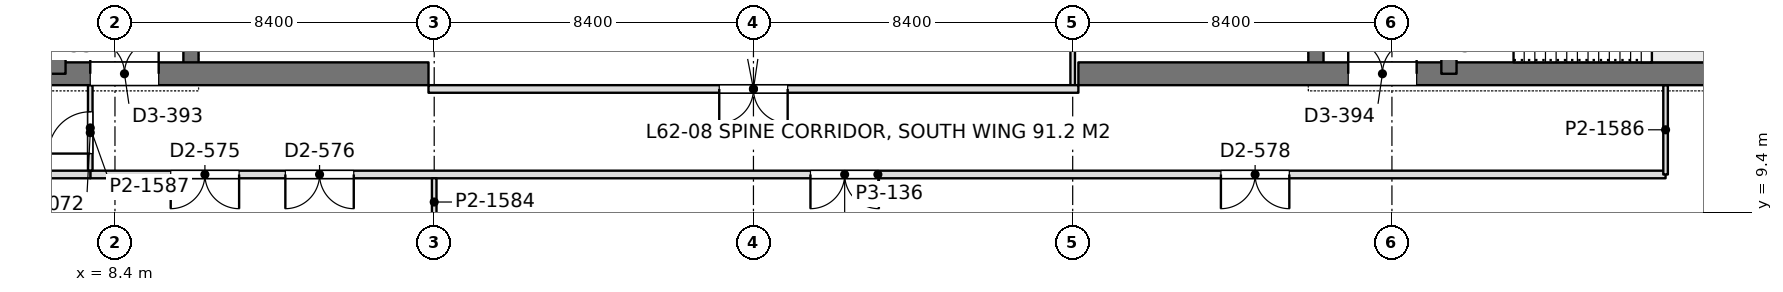
"""IFC4 building model, lengths in metres.
Left out: names, types, materials, properties, quantities, classifications, styles, units other than length and angle.
Written with IfcOpenShell. Run it as: python <this file> out.ifc"""

import sys

from ifc_helpers import new_model, si_unit, direction, frame, frame_2d, origin, place, context, subcontext, project, spatial, rectangle, extrude, element, fill, save


model = new_model("IFC4")
c1 = context("Model", 3, precision=1e-05, world=origin(), true_north=direction((0.0, 1.0)))
c2 = subcontext(c1, "Body", "Model", "MODEL_VIEW")
j1 = project(units=[si_unit("LENGTHUNIT", "METRE"), si_unit("PLANEANGLEUNIT", "RADIAN")], contexts=[c1])
p1 = place(None, origin())
s1 = spatial("IfcSite", under=j1, at=p1, CompositionType="ELEMENT")
p2 = place(p1, origin())
s2 = spatial("IfcBuilding", under=s1, at=p2, CompositionType="ELEMENT")
p3 = place(p2, frame((0.0, 0.0, 272.7)))
s3 = spatial("IfcBuildingStorey", under=s2, at=p3, CompositionType="ELEMENT", Elevation=272.7)
p4 = place(p3, frame((-1.05, 13.05, 0.0), z_axis=(0.0, 0.0, 1.0), x_axis=(1.0, 0.0, 0.0)))
e1 = element("IfcWall", 1, at=p4, inside=s3, PredefinedType="SHEAR", context=c2, shape_type="SweptSolid", body=[
    extrude(rectangle(XDim=17.7, YDim=0.6, at=frame_2d((8.85, 0.0))), origin(), (0.0, 0.0, 1.0), 4.5),
])
p5 = place(p4, frame((8.8, 0.0, 0.0)))
e2 = element("IfcOpeningElement", 2, at=p5, cuts=e1, PredefinedType="OPENING", context=c2, shape_type="SweptSolid", body=[
    extrude(rectangle(XDim=1.8, YDim=2.4, at=frame_2d((0.9, 1.2))), frame((0.0, 0.31, 0.0), z_axis=(0.0, -1.0, 0.0), x_axis=(1.0, 0.0, 0.0)), (0.0, 0.0, 1.0), 0.62),
])
p6 = place(p3, frame((6.9, 13.05, 0.0), z_axis=(0.0, 0.0, 1.0), x_axis=(0.0, 1.0, 0.0)))
e3 = element("IfcWall", 3, at=p6, inside=s3, PredefinedType="SHEAR", context=c2, shape_type="SweptSolid", body=[
    extrude(rectangle(XDim=24.3, YDim=0.4, at=frame_2d((12.15, 0.0))), origin(), (0.0, 0.0, 1.0), 4.5),
])
p7 = place(p6, frame((1.3, 0.0, 0.0)))
e4 = element("IfcOpeningElement", 4, at=p7, cuts=e3, PredefinedType="OPENING", context=c2, shape_type="SweptSolid", body=[
    extrude(rectangle(XDim=1.0, YDim=2.2, at=frame_2d((0.5, 1.1))), frame((0.0, 0.21, 0.0), z_axis=(0.0, -1.0, 0.0), x_axis=(1.0, 0.0, 0.0)), (0.0, 0.0, 1.0), 0.42),
])
p8 = place(p6, frame((22.0, 0.0, 0.0)))
e5 = element("IfcOpeningElement", 5, at=p8, cuts=e3, PredefinedType="OPENING", context=c2, shape_type="SweptSolid", body=[
    extrude(rectangle(XDim=1.0, YDim=2.2, at=frame_2d((0.5, 1.1))), frame((0.0, 0.21, 0.0), z_axis=(0.0, -1.0, 0.0), x_axis=(1.0, 0.0, 0.0)), (0.0, 0.0, 1.0), 0.42),
])
p9 = place(p6, frame((5.55, 0.0, 0.0)))
e6 = element("IfcOpeningElement", 6, at=p9, cuts=e3, PredefinedType="OPENING", context=c2, shape_type="SweptSolid", body=[
    extrude(rectangle(XDim=1.0, YDim=2.2, at=frame_2d((0.5, 1.1))), frame((0.0, 0.21, 0.0), z_axis=(0.0, -1.0, 0.0), x_axis=(1.0, 0.0, 0.0)), (0.0, 0.0, 1.0), 0.42),
])
p10 = place(p6, frame((9.55, 0.0, 0.0)))
e7 = element("IfcOpeningElement", 7, at=p10, cuts=e3, PredefinedType="OPENING", context=c2, shape_type="SweptSolid", body=[
    extrude(rectangle(XDim=1.0, YDim=2.2, at=frame_2d((0.5, 1.1))), frame((0.0, 0.21, 0.0), z_axis=(0.0, -1.0, 0.0), x_axis=(1.0, 0.0, 0.0)), (0.0, 0.0, 1.0), 0.42),
])
p11 = place(p6, frame((12.8, 0.0, 0.0)))
e8 = element("IfcOpeningElement", 8, at=p11, cuts=e3, PredefinedType="OPENING", context=c2, shape_type="SweptSolid", body=[
    extrude(rectangle(XDim=1.1, YDim=2.2, at=frame_2d((0.55, 1.1))), frame((0.0, 0.21, 0.0), z_axis=(0.0, -1.0, 0.0), x_axis=(1.0, 0.0, 0.0)), (0.0, 0.0, 1.0), 0.42),
])
p12 = place(p6, frame((15.538, 0.0, 0.0)))
e9 = element("IfcOpeningElement", 9, at=p12, cuts=e3, PredefinedType="OPENING", context=c2, shape_type="SweptSolid", body=[
    extrude(rectangle(XDim=1.1, YDim=2.2, at=frame_2d((0.55, 1.1))), frame((0.0, 0.21, 0.0), z_axis=(0.0, -1.0, 0.0), x_axis=(1.0, 0.0, 0.0)), (0.0, 0.0, 1.0), 0.42),
])
p13 = place(p6, frame((18.262, 0.0, 0.0)))
e10 = element("IfcOpeningElement", 10, at=p13, cuts=e3, PredefinedType="OPENING", context=c2, shape_type="SweptSolid", body=[
    extrude(rectangle(XDim=1.1, YDim=2.2, at=frame_2d((0.55, 1.1))), frame((0.0, 0.21, 0.0), z_axis=(0.0, -1.0, 0.0), x_axis=(1.0, 0.0, 0.0)), (0.0, 0.0, 1.0), 0.42),
])
p14 = place(p3, frame((10.4, 13.05, 0.0), z_axis=(0.0, 0.0, 1.0), x_axis=(0.0, 1.0, 0.0)))
e11 = element("IfcWall", 11, at=p14, inside=s3, PredefinedType="SHEAR", context=c2, shape_type="SweptSolid", body=[
    extrude(rectangle(XDim=24.3, YDim=0.4, at=frame_2d((12.15, 0.0))), origin(), (0.0, 0.0, 1.0), 4.5),
])
p15 = place(p14, frame((15.75, 0.0, 0.0)))
e12 = element("IfcOpeningElement", 12, at=p15, cuts=e11, PredefinedType="OPENING", context=c2, shape_type="SweptSolid", body=[
    extrude(rectangle(XDim=1.1, YDim=2.2, at=frame_2d((0.55, 1.1))), frame((0.0, 0.21, 0.0), z_axis=(0.0, -1.0, 0.0), x_axis=(1.0, 0.0, 0.0)), (0.0, 0.0, 1.0), 0.42),
])
p16 = place(p14, frame((18.6, 0.0, 0.0)))
e13 = element("IfcOpeningElement", 13, at=p16, cuts=e11, PredefinedType="OPENING", context=c2, shape_type="SweptSolid", body=[
    extrude(rectangle(XDim=1.1, YDim=2.2, at=frame_2d((0.55, 1.1))), frame((0.0, 0.21, 0.0), z_axis=(0.0, -1.0, 0.0), x_axis=(1.0, 0.0, 0.0)), (0.0, 0.0, 1.0), 0.42),
])
p17 = place(p14, frame((21.45, 0.0, 0.0)))
e14 = element("IfcOpeningElement", 14, at=p17, cuts=e11, PredefinedType="OPENING", context=c2, shape_type="SweptSolid", body=[
    extrude(rectangle(XDim=1.1, YDim=2.2, at=frame_2d((0.55, 1.1))), frame((0.0, 0.21, 0.0), z_axis=(0.0, -1.0, 0.0), x_axis=(1.0, 0.0, 0.0)), (0.0, 0.0, 1.0), 0.42),
])
p18 = place(p14, frame((8.65, 0.0, 0.0)))
e15 = element("IfcOpeningElement", 15, at=p18, cuts=e11, PredefinedType="OPENING", context=c2, shape_type="SweptSolid", body=[
    extrude(rectangle(XDim=1.8, YDim=2.4, at=frame_2d((0.9, 1.2))), frame((0.0, 0.21, 0.0), z_axis=(0.0, -1.0, 0.0), x_axis=(1.0, 0.0, 0.0)), (0.0, 0.0, 1.0), 0.42),
])
p19 = place(p3, frame((33.75, 13.05, 0.0), z_axis=(0.0, 0.0, 1.0), x_axis=(1.0, 0.0, 0.0)))
e16 = element("IfcWall", 16, at=p19, inside=s3, PredefinedType="SHEAR", context=c2, shape_type="SweptSolid", body=[
    extrude(rectangle(XDim=17.7, YDim=0.6, at=frame_2d((8.85, 0.0))), origin(), (0.0, 0.0, 1.0), 4.5),
])
p20 = place(p19, frame((7.1, 0.0, 0.0)))
e17 = element("IfcOpeningElement", 17, at=p20, cuts=e16, PredefinedType="OPENING", context=c2, shape_type="SweptSolid", body=[
    extrude(rectangle(XDim=1.8, YDim=2.4, at=frame_2d((0.9, 1.2))), frame((0.0, 0.31, 0.0), z_axis=(0.0, -1.0, 0.0), x_axis=(1.0, 0.0, 0.0)), (0.0, 0.0, 1.0), 0.62),
])
p21 = place(p3, frame((43.5, 13.05, 0.0), z_axis=(0.0, 0.0, 1.0), x_axis=(0.0, 1.0, 0.0)))
e18 = element("IfcWall", 18, at=p21, inside=s3, PredefinedType="SHEAR", context=c2, shape_type="SweptSolid", body=[
    extrude(rectangle(XDim=24.3, YDim=0.4, at=frame_2d((12.15, 0.0))), origin(), (0.0, 0.0, 1.0), 4.5),
])
p22 = place(p21, frame((1.3, 0.0, 0.0)))
e19 = element("IfcOpeningElement", 19, at=p22, cuts=e18, PredefinedType="OPENING", context=c2, shape_type="SweptSolid", body=[
    extrude(rectangle(XDim=1.0, YDim=2.2, at=frame_2d((0.5, 1.1))), frame((0.0, 0.21, 0.0), z_axis=(0.0, -1.0, 0.0), x_axis=(1.0, 0.0, 0.0)), (0.0, 0.0, 1.0), 0.42),
])
p23 = place(p21, frame((22.0, 0.0, 0.0)))
e20 = element("IfcOpeningElement", 20, at=p23, cuts=e18, PredefinedType="OPENING", context=c2, shape_type="SweptSolid", body=[
    extrude(rectangle(XDim=1.0, YDim=2.2, at=frame_2d((0.5, 1.1))), frame((0.0, 0.21, 0.0), z_axis=(0.0, -1.0, 0.0), x_axis=(1.0, 0.0, 0.0)), (0.0, 0.0, 1.0), 0.42),
])
p24 = place(p21, frame((5.55, 0.0, 0.0)))
e21 = element("IfcOpeningElement", 21, at=p24, cuts=e18, PredefinedType="OPENING", context=c2, shape_type="SweptSolid", body=[
    extrude(rectangle(XDim=1.0, YDim=2.2, at=frame_2d((0.5, 1.1))), frame((0.0, 0.21, 0.0), z_axis=(0.0, -1.0, 0.0), x_axis=(1.0, 0.0, 0.0)), (0.0, 0.0, 1.0), 0.42),
])
p25 = place(p21, frame((9.55, 0.0, 0.0)))
e22 = element("IfcOpeningElement", 22, at=p25, cuts=e18, PredefinedType="OPENING", context=c2, shape_type="SweptSolid", body=[
    extrude(rectangle(XDim=1.0, YDim=2.2, at=frame_2d((0.5, 1.1))), frame((0.0, 0.21, 0.0), z_axis=(0.0, -1.0, 0.0), x_axis=(1.0, 0.0, 0.0)), (0.0, 0.0, 1.0), 0.42),
])
p26 = place(p21, frame((12.8, 0.0, 0.0)))
e23 = element("IfcOpeningElement", 23, at=p26, cuts=e18, PredefinedType="OPENING", context=c2, shape_type="SweptSolid", body=[
    extrude(rectangle(XDim=1.1, YDim=2.2, at=frame_2d((0.55, 1.1))), frame((0.0, 0.21, 0.0), z_axis=(0.0, -1.0, 0.0), x_axis=(1.0, 0.0, 0.0)), (0.0, 0.0, 1.0), 0.42),
])
p27 = place(p21, frame((15.538, 0.0, 0.0)))
e24 = element("IfcOpeningElement", 24, at=p27, cuts=e18, PredefinedType="OPENING", context=c2, shape_type="SweptSolid", body=[
    extrude(rectangle(XDim=1.1, YDim=2.2, at=frame_2d((0.55, 1.1))), frame((0.0, 0.21, 0.0), z_axis=(0.0, -1.0, 0.0), x_axis=(1.0, 0.0, 0.0)), (0.0, 0.0, 1.0), 0.42),
])
p28 = place(p21, frame((18.262, 0.0, 0.0)))
e25 = element("IfcOpeningElement", 25, at=p28, cuts=e18, PredefinedType="OPENING", context=c2, shape_type="SweptSolid", body=[
    extrude(rectangle(XDim=1.1, YDim=2.2, at=frame_2d((0.55, 1.1))), frame((0.0, 0.21, 0.0), z_axis=(0.0, -1.0, 0.0), x_axis=(1.0, 0.0, 0.0)), (0.0, 0.0, 1.0), 0.42),
])
p29 = place(p3, frame((40.0, 13.05, 0.0), z_axis=(0.0, 0.0, 1.0), x_axis=(0.0, 1.0, 0.0)))
e26 = element("IfcWall", 26, at=p29, inside=s3, PredefinedType="SHEAR", context=c2, shape_type="SweptSolid", body=[
    extrude(rectangle(XDim=24.3, YDim=0.4, at=frame_2d((12.15, 0.0))), origin(), (0.0, 0.0, 1.0), 4.5),
])
p30 = place(p29, frame((15.75, 0.0, 0.0)))
e27 = element("IfcOpeningElement", 27, at=p30, cuts=e26, PredefinedType="OPENING", context=c2, shape_type="SweptSolid", body=[
    extrude(rectangle(XDim=1.1, YDim=2.2, at=frame_2d((0.55, 1.1))), frame((0.0, 0.21, 0.0), z_axis=(0.0, -1.0, 0.0), x_axis=(1.0, 0.0, 0.0)), (0.0, 0.0, 1.0), 0.42),
])
p31 = place(p29, frame((18.6, 0.0, 0.0)))
e28 = element("IfcOpeningElement", 28, at=p31, cuts=e26, PredefinedType="OPENING", context=c2, shape_type="SweptSolid", body=[
    extrude(rectangle(XDim=1.1, YDim=2.2, at=frame_2d((0.55, 1.1))), frame((0.0, 0.21, 0.0), z_axis=(0.0, -1.0, 0.0), x_axis=(1.0, 0.0, 0.0)), (0.0, 0.0, 1.0), 0.42),
])
p32 = place(p29, frame((21.45, 0.0, 0.0)))
e29 = element("IfcOpeningElement", 29, at=p32, cuts=e26, PredefinedType="OPENING", context=c2, shape_type="SweptSolid", body=[
    extrude(rectangle(XDim=1.1, YDim=2.2, at=frame_2d((0.55, 1.1))), frame((0.0, 0.21, 0.0), z_axis=(0.0, -1.0, 0.0), x_axis=(1.0, 0.0, 0.0)), (0.0, 0.0, 1.0), 0.42),
])
p33 = place(p29, frame((8.65, 0.0, 0.0)))
e30 = element("IfcOpeningElement", 30, at=p33, cuts=e26, PredefinedType="OPENING", context=c2, shape_type="SweptSolid", body=[
    extrude(rectangle(XDim=1.8, YDim=2.4, at=frame_2d((0.9, 1.2))), frame((0.0, 0.21, 0.0), z_axis=(0.0, -1.0, 0.0), x_axis=(1.0, 0.0, 0.0)), (0.0, 0.0, 1.0), 0.42),
])
p34 = place(p29, frame((1.5, 0.0, 0.0)))
e31 = element("IfcOpeningElement", 31, at=p34, cuts=e26, PredefinedType="OPENING", context=c2, shape_type="SweptSolid", body=[
    extrude(rectangle(XDim=1.8, YDim=2.4, at=frame_2d((0.9, 1.2))), frame((0.0, 0.21, 0.0), z_axis=(0.0, -1.0, 0.0), x_axis=(1.0, 0.0, 0.0)), (0.0, 0.0, 1.0), 0.42),
])
p35 = place(p3, frame((33.6, 12.6, 0.0), z_axis=(0.0, 0.0, 1.0), x_axis=(0.0, 1.0, 0.0)))
e32 = element("IfcWall", 32, at=p35, inside=s3, PredefinedType="PARTITIONING", context=c2, shape_type="SweptSolid", body=[
    extrude(rectangle(XDim=4.502, YDim=0.12, at=frame_2d((2.251, 0.0))), origin(), (0.0, 0.0, 1.0), 3.66),
])
p36 = place(p3, frame((16.8, 9.049, 0.0), z_axis=(0.0, 0.0, 1.0), x_axis=(0.0, 1.0, 0.0)))
e33 = element("IfcWall", 33, at=p36, inside=s3, PredefinedType="PARTITIONING", context=c2, shape_type="SweptSolid", body=[
    extrude(rectangle(XDim=1.253, YDim=0.12, at=frame_2d((0.626, 0.0))), origin(), (0.0, 0.0, 1.0), 3.99),
])
p37 = place(p3, frame((7.748, 10.4, 0.0), z_axis=(0.0, 0.0, 1.0), x_axis=(1.0, 0.0, 0.0)))
e34 = element("IfcWall", 34, at=p37, inside=s3, PredefinedType="PARTITIONING", context=c2, shape_type="SweptSolid", body=[
    extrude(rectangle(XDim=41.452, YDim=0.2, at=frame_2d((20.726, 0.0))), origin(), (0.0, 0.0, 1.0), 3.8),
])
p38 = place(p37, frame((2.119, 0.0, 0.0)))
e35 = element("IfcOpeningElement", 35, at=p38, cuts=e34, PredefinedType="OPENING", context=c2, shape_type="SweptSolid", body=[
    extrude(rectangle(XDim=1.8, YDim=2.2, at=frame_2d((0.9, 1.1))), frame((0.0, 0.11, 0.0), z_axis=(0.0, -1.0, 0.0), x_axis=(1.0, 0.0, 0.0)), (0.0, 0.0, 1.0), 0.22),
])
p39 = place(p37, frame((5.135, 0.0, 0.0)))
e36 = element("IfcOpeningElement", 36, at=p39, cuts=e34, PredefinedType="OPENING", context=c2, shape_type="SweptSolid", body=[
    extrude(rectangle(XDim=1.8, YDim=2.2, at=frame_2d((0.9, 1.1))), frame((0.0, 0.11, 0.0), z_axis=(0.0, -1.0, 0.0), x_axis=(1.0, 0.0, 0.0)), (0.0, 0.0, 1.0), 0.22),
])
p40 = place(p37, frame((18.952, 0.0, 0.0)))
e37 = element("IfcOpeningElement", 37, at=p40, cuts=e34, PredefinedType="OPENING", context=c2, shape_type="SweptSolid", body=[
    extrude(rectangle(XDim=1.8, YDim=2.2, at=frame_2d((0.9, 1.1))), frame((0.0, 0.11, 0.0), z_axis=(0.0, -1.0, 0.0), x_axis=(1.0, 0.0, 0.0)), (0.0, 0.0, 1.0), 0.22),
])
p41 = place(p37, frame((29.752, 0.0, 0.0)))
e38 = element("IfcOpeningElement", 38, at=p41, cuts=e34, PredefinedType="OPENING", context=c2, shape_type="SweptSolid", body=[
    extrude(rectangle(XDim=1.8, YDim=2.2, at=frame_2d((0.9, 1.1))), frame((0.0, 0.11, 0.0), z_axis=(0.0, -1.0, 0.0), x_axis=(1.0, 0.0, 0.0)), (0.0, 0.0, 1.0), 0.22),
])
p42 = place(p3, frame((7.75, 10.498, 0.0), z_axis=(0.0, 0.0, 1.0), x_axis=(0.0, 1.0, 0.0)))
e39 = element("IfcWall", 39, at=p42, inside=s3, PredefinedType="PARTITIONING", context=c2, shape_type="SweptSolid", body=[
    extrude(rectangle(XDim=2.254, YDim=0.12, at=frame_2d((1.127, 0.0))), origin(), (0.0, 0.0, 1.0), 4.35),
])
p43 = place(p42, frame((0.452, 0.0, 0.0)))
e40 = element("IfcOpeningElement", 40, at=p43, cuts=e39, PredefinedType="OPENING", context=c2, shape_type="SweptSolid", body=[
    extrude(rectangle(XDim=1.1, YDim=2.4, at=frame_2d((0.55, 1.2))), frame((0.0, 0.07, 0.0), z_axis=(0.0, -1.0, 0.0), x_axis=(1.0, 0.0, 0.0)), (0.0, 0.0, 1.0), 0.14),
])
p44 = place(p3, frame((49.2, 10.4, 0.0), z_axis=(0.0, 0.0, 1.0), x_axis=(0.0, 1.0, 0.0)))
e41 = element("IfcWall", 41, at=p44, inside=s3, PredefinedType="PARTITIONING", context=c2, shape_type="SweptSolid", body=[
    extrude(rectangle(XDim=2.352, YDim=0.12, at=frame_2d((1.176, 0.0))), origin(), (0.0, 0.0, 1.0), 4.35),
])
p45 = place(p3, frame((1.2, 10.4, 0.0), z_axis=(0.0, 0.0, 1.0), x_axis=(1.0, 0.0, 0.0)))
e42 = element("IfcWall", 42, at=p45, inside=s3, PredefinedType="PARTITIONING", context=c2, shape_type="SweptSolid", body=[
    extrude(rectangle(XDim=6.552, YDim=0.2, at=frame_2d((3.276, 0.0))), origin(), (0.0, 0.0, 1.0), 4.35),
])
p46 = place(p3, frame((16.65, 12.65, 0.0), z_axis=(0.0, 0.0, 1.0), x_axis=(1.0, 0.0, 0.0)))
e43 = element("IfcWall", 43, at=p46, inside=s3, PredefinedType="PARTITIONING", context=c2, shape_type="SweptSolid", body=[
    extrude(rectangle(XDim=17.1, YDim=0.2, at=frame_2d((8.55, 0.0))), origin(), (0.0, 0.0, 1.0), 3.8),
])
p47 = place(p46, frame((7.65, 0.0, 0.0)))
e44 = element("IfcOpeningElement", 44, at=p47, cuts=e43, PredefinedType="OPENING", context=c2, shape_type="SweptSolid", body=[
    extrude(rectangle(XDim=1.8, YDim=2.2, at=frame_2d((0.9, 1.1))), frame((0.0, 0.11, 0.0), z_axis=(0.0, -1.0, 0.0), x_axis=(1.0, 0.0, 0.0)), (0.0, 0.0, 1.0), 0.22),
])
p48 = place(p5, origin())
e45 = element("IfcDoor", 45, at=p48, inside=s3, OperationType="DOUBLE_DOOR_SINGLE_SWING", PredefinedType="DOOR", context=c2, shape_type="SweptSolid", body=[
    extrude(rectangle(XDim=1.8, YDim=2.4, at=frame_2d((0.9, 1.2))), frame((0.0, 0.025, 0.0), z_axis=(0.0, -1.0, 0.0), x_axis=(1.0, 0.0, 0.0)), (0.0, 0.0, 1.0), 0.05),
])
fill(e2, e45)
p49 = place(p20, origin())
e46 = element("IfcDoor", 46, at=p49, inside=s3, OperationType="DOUBLE_DOOR_SINGLE_SWING", PredefinedType="DOOR", context=c2, shape_type="SweptSolid", body=[
    extrude(rectangle(XDim=1.8, YDim=2.4, at=frame_2d((0.9, 1.2))), frame((0.0, 0.025, 0.0), z_axis=(0.0, -1.0, 0.0), x_axis=(1.0, 0.0, 0.0)), (0.0, 0.0, 1.0), 0.05),
])
fill(e17, e46)
p50 = place(p38, frame((1.8, 0.0, 0.0), z_axis=(0.0, 0.0, 1.0), x_axis=(-1.0, 0.0, 0.0)))
e47 = element("IfcDoor", 47, at=p50, inside=s3, OperationType="DOUBLE_DOOR_SINGLE_SWING", PredefinedType="DOOR", context=c2, shape_type="SweptSolid", body=[
    extrude(rectangle(XDim=1.8, YDim=2.2, at=frame_2d((0.9, 1.1))), frame((0.0, 0.025, 0.0), z_axis=(0.0, -1.0, 0.0), x_axis=(1.0, 0.0, 0.0)), (0.0, 0.0, 1.0), 0.05),
])
fill(e35, e47)
p51 = place(p39, frame((1.8, 0.0, 0.0), z_axis=(0.0, 0.0, 1.0), x_axis=(-1.0, 0.0, 0.0)))
e48 = element("IfcDoor", 48, at=p51, inside=s3, OperationType="DOUBLE_DOOR_SINGLE_SWING", PredefinedType="DOOR", context=c2, shape_type="SweptSolid", body=[
    extrude(rectangle(XDim=1.8, YDim=2.2, at=frame_2d((0.9, 1.1))), frame((0.0, 0.025, 0.0), z_axis=(0.0, -1.0, 0.0), x_axis=(1.0, 0.0, 0.0)), (0.0, 0.0, 1.0), 0.05),
])
fill(e36, e48)
p52 = place(p40, frame((1.8, 0.0, 0.0), z_axis=(0.0, 0.0, 1.0), x_axis=(-1.0, 0.0, 0.0)))
e49 = element("IfcDoor", 49, at=p52, inside=s3, OperationType="DOUBLE_DOOR_SINGLE_SWING", PredefinedType="DOOR", context=c2, shape_type="SweptSolid", body=[
    extrude(rectangle(XDim=1.8, YDim=2.2, at=frame_2d((0.9, 1.1))), frame((0.0, 0.025, 0.0), z_axis=(0.0, -1.0, 0.0), x_axis=(1.0, 0.0, 0.0)), (0.0, 0.0, 1.0), 0.05),
])
fill(e37, e49)
p53 = place(p41, frame((1.8, 0.0, 0.0), z_axis=(0.0, 0.0, 1.0), x_axis=(-1.0, 0.0, 0.0)))
e50 = element("IfcDoor", 50, at=p53, inside=s3, OperationType="DOUBLE_DOOR_SINGLE_SWING", PredefinedType="DOOR", context=c2, shape_type="SweptSolid", body=[
    extrude(rectangle(XDim=1.8, YDim=2.2, at=frame_2d((0.9, 1.1))), frame((0.0, 0.025, 0.0), z_axis=(0.0, -1.0, 0.0), x_axis=(1.0, 0.0, 0.0)), (0.0, 0.0, 1.0), 0.05),
])
fill(e38, e50)
p54 = place(p43, origin())
e51 = element("IfcDoor", 51, at=p54, inside=s3, OperationType="SINGLE_SWING_LEFT", PredefinedType="DOOR", context=c2, shape_type="SweptSolid", body=[
    extrude(rectangle(XDim=1.1, YDim=2.4, at=frame_2d((0.55, 1.2))), frame((0.0, 0.025, 0.0), z_axis=(0.0, -1.0, 0.0), x_axis=(1.0, 0.0, 0.0)), (0.0, 0.0, 1.0), 0.05),
])
fill(e40, e51)
p55 = place(p47, frame((1.8, 0.0, 0.0), z_axis=(0.0, 0.0, 1.0), x_axis=(-1.0, 0.0, 0.0)))
e52 = element("IfcDoor", 52, at=p55, inside=s3, OperationType="DOUBLE_DOOR_SINGLE_SWING", PredefinedType="DOOR", context=c2, shape_type="SweptSolid", body=[
    extrude(rectangle(XDim=1.8, YDim=2.2, at=frame_2d((0.9, 1.1))), frame((0.0, 0.025, 0.0), z_axis=(0.0, -1.0, 0.0), x_axis=(1.0, 0.0, 0.0)), (0.0, 0.0, 1.0), 0.05),
])
fill(e44, e52)
save(model, sys.argv[1])
